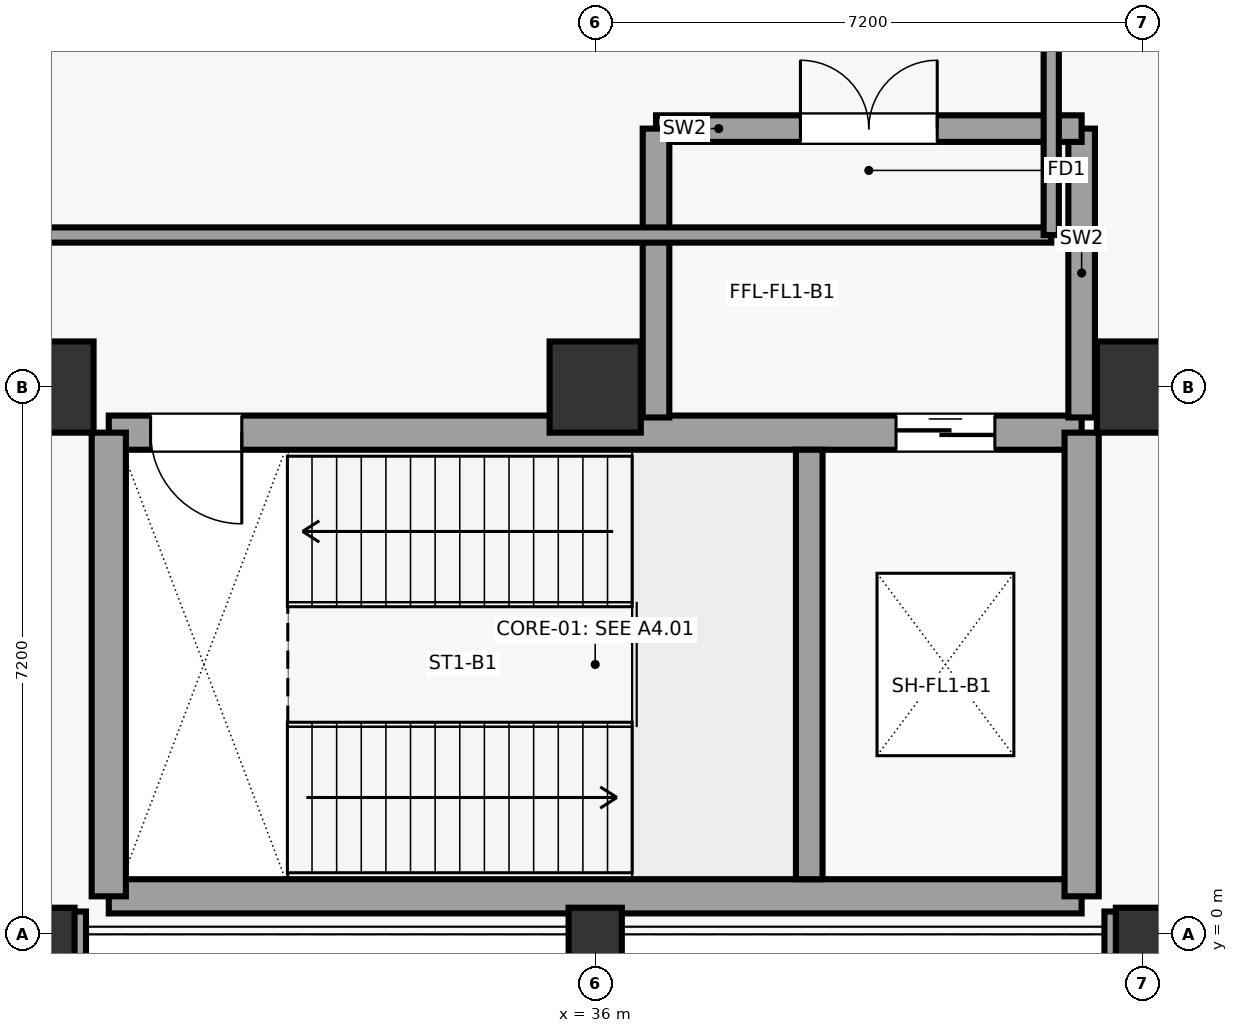
"""IFC4 building model, lengths in metres.
Left out: names, types, materials, properties, quantities, classifications, styles, units other than length and angle.
Written with IfcOpenShell. Run it as: python <this file> out.ifc"""

import sys

from ifc_helpers import new_model, si_unit, direction, frame, frame_2d, origin, origin_with_axes, origin_2d, place, context, subcontext, project, spatial, rectangle, circle, extrude, element, fill, save


model = new_model("IFC4")
c1 = context("Model", 3, precision=1e-05, world=origin(), true_north=direction((0.0, 1.0)))
c2 = subcontext(c1, "Body", "Model", "MODEL_VIEW")
j1 = project(units=[si_unit("LENGTHUNIT", "METRE"), si_unit("PLANEANGLEUNIT", "RADIAN")], contexts=[c1])
p1 = place(None, origin())
s1 = spatial("IfcSite", under=j1, at=p1, CompositionType="ELEMENT")
p2 = place(p1, origin())
s2 = spatial("IfcBuilding", under=s1, at=p2, CompositionType="ELEMENT")
p3 = place(p2, frame((0.0, 0.0, -5.4)))
s3 = spatial("IfcBuildingStorey", under=s2, at=p3, CompositionType="ELEMENT", Elevation=-5.4)
p4 = place(p3, frame((28.8, 0.0, 0.0), z_axis=(0.0, 0.0, 1.0), x_axis=(1.0, 0.0, 0.0)))
e1 = element("IfcColumn", 1, at=p4, inside=s3, PredefinedType="COLUMN", context=c2, shape_type="SweptSolid", body=[
    extrude(rectangle(XDim=0.7, YDim=0.7, at=origin_2d()), origin(), (0.0, 0.0, 1.0), 5.4),
])
p5 = place(p3, frame((28.8, 7.2, 0.0), z_axis=(0.0, 0.0, 1.0), x_axis=(1.0, 0.0, 0.0)))
e2 = element("IfcColumn", 2, at=p5, inside=s3, PredefinedType="COLUMN", context=c2, shape_type="SweptSolid", body=[
    extrude(circle(Radius=0.6, at=origin_2d()), origin(), (0.0, 0.0, 1.0), 5.4),
])
p6 = place(p3, frame((36.0, 0.0, 0.0), z_axis=(0.0, 0.0, 1.0), x_axis=(1.0, 0.0, 0.0)))
e3 = element("IfcColumn", 3, at=p6, inside=s3, PredefinedType="COLUMN", context=c2, shape_type="SweptSolid", body=[
    extrude(rectangle(XDim=0.7, YDim=0.7, at=origin_2d()), origin(), (0.0, 0.0, 1.0), 5.4),
])
p7 = place(p3, frame((36.0, 7.2, 0.0), z_axis=(0.0, 0.0, 1.0), x_axis=(1.0, 0.0, 0.0)))
e4 = element("IfcColumn", 4, at=p7, inside=s3, PredefinedType="COLUMN", context=c2, shape_type="SweptSolid", body=[
    extrude(circle(Radius=0.6, at=origin_2d()), origin(), (0.0, 0.0, 1.0), 5.4),
])
p8 = place(p3, frame((43.2, 0.0, 0.0), z_axis=(0.0, 0.0, 1.0), x_axis=(1.0, 0.0, 0.0)))
e5 = element("IfcColumn", 5, at=p8, inside=s3, PredefinedType="COLUMN", context=c2, shape_type="SweptSolid", body=[
    extrude(rectangle(XDim=0.7, YDim=0.7, at=origin_2d()), origin(), (0.0, 0.0, 1.0), 5.4),
])
p9 = place(p3, frame((43.2, 7.2, 0.0), z_axis=(0.0, 0.0, 1.0), x_axis=(1.0, 0.0, 0.0)))
e6 = element("IfcColumn", 6, at=p9, inside=s3, PredefinedType="COLUMN", context=c2, shape_type="SweptSolid", body=[
    extrude(circle(Radius=0.6, at=origin_2d()), origin(), (0.0, 0.0, 1.0), 5.4),
])
p10 = place(p3, origin_with_axes())
e7 = element("IfcWall", 7, at=p10, inside=s3, PredefinedType="USERDEFINED", context=c2, shape_type="SweptSolid", body=[
    extrude(rectangle(XDim=29.3, YDim=0.6, at=frame_2d((14.65, 0.0))), origin(), (0.0, 0.0, 1.0), 4.98),
])
p11 = place(p3, frame((42.7, 0.0, 0.0), z_axis=(0.0, 0.0, 1.0), x_axis=(1.0, 0.0, 0.0)))
e8 = element("IfcWall", 8, at=p11, inside=s3, PredefinedType="USERDEFINED", context=c2, shape_type="SweptSolid", body=[
    extrude(rectangle(XDim=29.8, YDim=0.6, at=frame_2d((14.9, 0.0))), origin(), (0.0, 0.0, 1.0), 4.98),
])
p12 = place(p3, frame((29.6, 0.5, 0.0), z_axis=(0.0, 0.0, 1.0), x_axis=(1.0, 0.0, 0.0)))
e9 = element("IfcWall", 9, at=p12, inside=s3, PredefinedType="SHEAR", context=c2, shape_type="SweptSolid", body=[
    extrude(rectangle(XDim=12.8, YDim=0.45, at=frame_2d((6.4, 0.0))), origin(), (0.0, 0.0, 1.0), 5.02),
])
p13 = place(p3, frame((29.6, 6.6, 0.0), z_axis=(0.0, 0.0, 1.0), x_axis=(1.0, 0.0, 0.0)))
e10 = element("IfcWall", 10, at=p13, inside=s3, PredefinedType="SHEAR", context=c2, shape_type="SweptSolid", body=[
    extrude(rectangle(XDim=12.8, YDim=0.45, at=frame_2d((6.4, 0.0))), origin(), (0.0, 0.0, 1.0), 5.02),
])
p14 = place(p13, frame((0.55, 0.0, 0.0)))
e11 = element("IfcOpeningElement", 11, at=p14, cuts=e10, PredefinedType="OPENING", context=c2, shape_type="SweptSolid", body=[
    extrude(rectangle(XDim=1.2, YDim=2.25, at=frame_2d((0.6, 1.125))), frame((0.0, 0.235, 0.0), z_axis=(0.0, -1.0, 0.0), x_axis=(1.0, 0.0, 0.0)), (0.0, 0.0, 1.0), 0.47),
])
p15 = place(p13, frame((10.358, 0.0, 0.0)))
e12 = element("IfcOpeningElement", 12, at=p15, cuts=e10, PredefinedType="OPENING", context=c2, shape_type="SweptSolid", body=[
    extrude(rectangle(XDim=1.3, YDim=2.25, at=frame_2d((0.65, 1.125))), frame((0.0, 0.235, 0.0), z_axis=(0.0, -1.0, 0.0), x_axis=(1.0, 0.0, 0.0)), (0.0, 0.0, 1.0), 0.47),
])
for number, where, z_axis, x_axis in (
    (13, (29.6, 0.5, 0.0), (0.0, 0.0, 1.0), (0.0, 1.0, 0.0)),
    (14, (42.4, 0.5, 0.0), (0.0, 0.0, 1.0), (0.0, 1.0, 0.0)),
):
    element("IfcWall", number, at=place(p3, frame(where, z_axis=z_axis, x_axis=x_axis)), inside=s3, PredefinedType="SHEAR", context=c2, shape_type="SweptSolid", body=[
        extrude(rectangle(XDim=6.1, YDim=0.45, at=frame_2d((3.05, 0.0))), origin(), (0.0, 0.0, 1.0), 5.02),
    ])
p16 = place(p3, frame((38.816, 0.725, 0.0), z_axis=(0.0, 0.0, 1.0), x_axis=(0.0, 1.0, 0.0)))
e15 = element("IfcWall", 15, at=p16, inside=s3, PredefinedType="SHEAR", context=c2, shape_type="SweptSolid", body=[
    extrude(rectangle(XDim=5.65, YDim=0.35, at=frame_2d((2.825, 0.0))), origin(), (0.0, 0.0, 1.0), 5.02),
])
p17 = place(p3, frame((42.4, 6.8, 0.0), z_axis=(0.0, 0.0, 1.0), x_axis=(0.0, 1.0, 0.0)))
e16 = element("IfcWall", 16, at=p17, inside=s3, PredefinedType="SHEAR", context=c2, shape_type="SweptSolid", body=[
    extrude(rectangle(XDim=3.8, YDim=0.35, at=frame_2d((1.9, 0.0))), origin(), (0.0, 0.0, 1.0), 4.04),
])
p18 = place(p3, frame((42.4, 10.6, 0.0), z_axis=(0.0, 0.0, 1.0), x_axis=(-1.0, 0.0, 0.0)))
e17 = element("IfcWall", 17, at=p18, inside=s3, PredefinedType="SHEAR", context=c2, shape_type="SweptSolid", body=[
    extrude(rectangle(XDim=5.6, YDim=0.35, at=frame_2d((2.8, 0.0))), origin(), (0.0, 0.0, 1.0), 4.04),
])
p19 = place(p18, frame((1.9, 0.0, 0.0)))
e18 = element("IfcOpeningElement", 18, at=p19, cuts=e17, PredefinedType="OPENING", context=c2, shape_type="SweptSolid", body=[
    extrude(rectangle(XDim=1.8, YDim=2.3, at=frame_2d((0.9, 1.15))), frame((0.0, 0.185, 0.0), z_axis=(0.0, -1.0, 0.0), x_axis=(1.0, 0.0, 0.0)), (0.0, 0.0, 1.0), 0.37),
])
p20 = place(p3, frame((36.8, 10.6, 0.0), z_axis=(0.0, 0.0, 1.0), x_axis=(0.0, -1.0, 0.0)))
e19 = element("IfcWall", 19, at=p20, inside=s3, PredefinedType="SHEAR", context=c2, shape_type="SweptSolid", body=[
    extrude(rectangle(XDim=3.8, YDim=0.35, at=frame_2d((1.9, 0.0))), origin(), (0.0, 0.0, 1.0), 4.04),
])
p21 = place(p3, frame((9.2, 9.2, 0.0), z_axis=(0.0, 0.0, 1.0), x_axis=(1.0, 0.0, 0.0)))
e20 = element("IfcWall", 20, at=p21, inside=s3, PredefinedType="PARTITIONING", context=c2, shape_type="SweptSolid", body=[
    extrude(rectangle(XDim=32.8, YDim=0.2, at=frame_2d((16.4, 0.0))), origin(), (0.0, 0.0, 1.0), 4.04),
])
p22 = place(p3, frame((42.0, 9.2, 0.0), z_axis=(0.0, 0.0, 1.0), x_axis=(0.0, 1.0, 0.0)))
e21 = element("IfcWall", 21, at=p22, inside=s3, PredefinedType="PARTITIONING", context=c2, shape_type="SweptSolid", body=[
    extrude(rectangle(XDim=41.2, YDim=0.2, at=frame_2d((20.6, 0.0))), origin(), (0.0, 0.0, 1.0), 4.04),
])
p23 = place(p22, frame((20.5, 0.0, 0.0)))
e22 = element("IfcOpeningElement", 22, at=p23, cuts=e21, PredefinedType="OPENING", context=c2, shape_type="SweptSolid", body=[
    extrude(rectangle(XDim=1.8, YDim=2.3, at=frame_2d((0.9, 1.15))), frame((0.0, 0.11, 0.0), z_axis=(0.0, -1.0, 0.0), x_axis=(1.0, 0.0, 0.0)), (0.0, 0.0, 1.0), 0.22),
])
p24 = place(p14, frame((1.2, 0.0, 0.0), z_axis=(0.0, 0.0, 1.0), x_axis=(-1.0, 0.0, 0.0)))
e23 = element("IfcDoor", 23, at=p24, inside=s3, OperationType="SINGLE_SWING_RIGHT", PredefinedType="DOOR", context=c2, shape_type="SweptSolid", body=[
    extrude(rectangle(XDim=1.2, YDim=2.25, at=frame_2d((0.6, 1.125))), frame((0.0, 0.025, 0.0), z_axis=(0.0, -1.0, 0.0), x_axis=(1.0, 0.0, 0.0)), (0.0, 0.0, 1.0), 0.05),
])
fill(e11, e23)
p25 = place(p15, origin())
e24 = element("IfcDoor", 24, at=p25, inside=s3, OperationType="SLIDING_TO_LEFT", PredefinedType="DOOR", context=c2, shape_type="SweptSolid", body=[
    extrude(rectangle(XDim=1.3, YDim=2.25, at=frame_2d((0.65, 1.125))), frame((0.0, 0.025, 0.0), z_axis=(0.0, -1.0, 0.0), x_axis=(1.0, 0.0, 0.0)), (0.0, 0.0, 1.0), 0.05),
])
fill(e12, e24)
p26 = place(p19, frame((1.8, 0.0, 0.0), z_axis=(0.0, 0.0, 1.0), x_axis=(-1.0, 0.0, 0.0)))
e25 = element("IfcDoor", 25, at=p26, inside=s3, OperationType="DOUBLE_DOOR_SINGLE_SWING", PredefinedType="DOOR", context=c2, shape_type="SweptSolid", body=[
    extrude(rectangle(XDim=1.8, YDim=2.3, at=frame_2d((0.9, 1.15))), frame((0.0, 0.025, 0.0), z_axis=(0.0, -1.0, 0.0), x_axis=(1.0, 0.0, 0.0)), (0.0, 0.0, 1.0), 0.05),
])
fill(e18, e25)
save(model, sys.argv[1])
